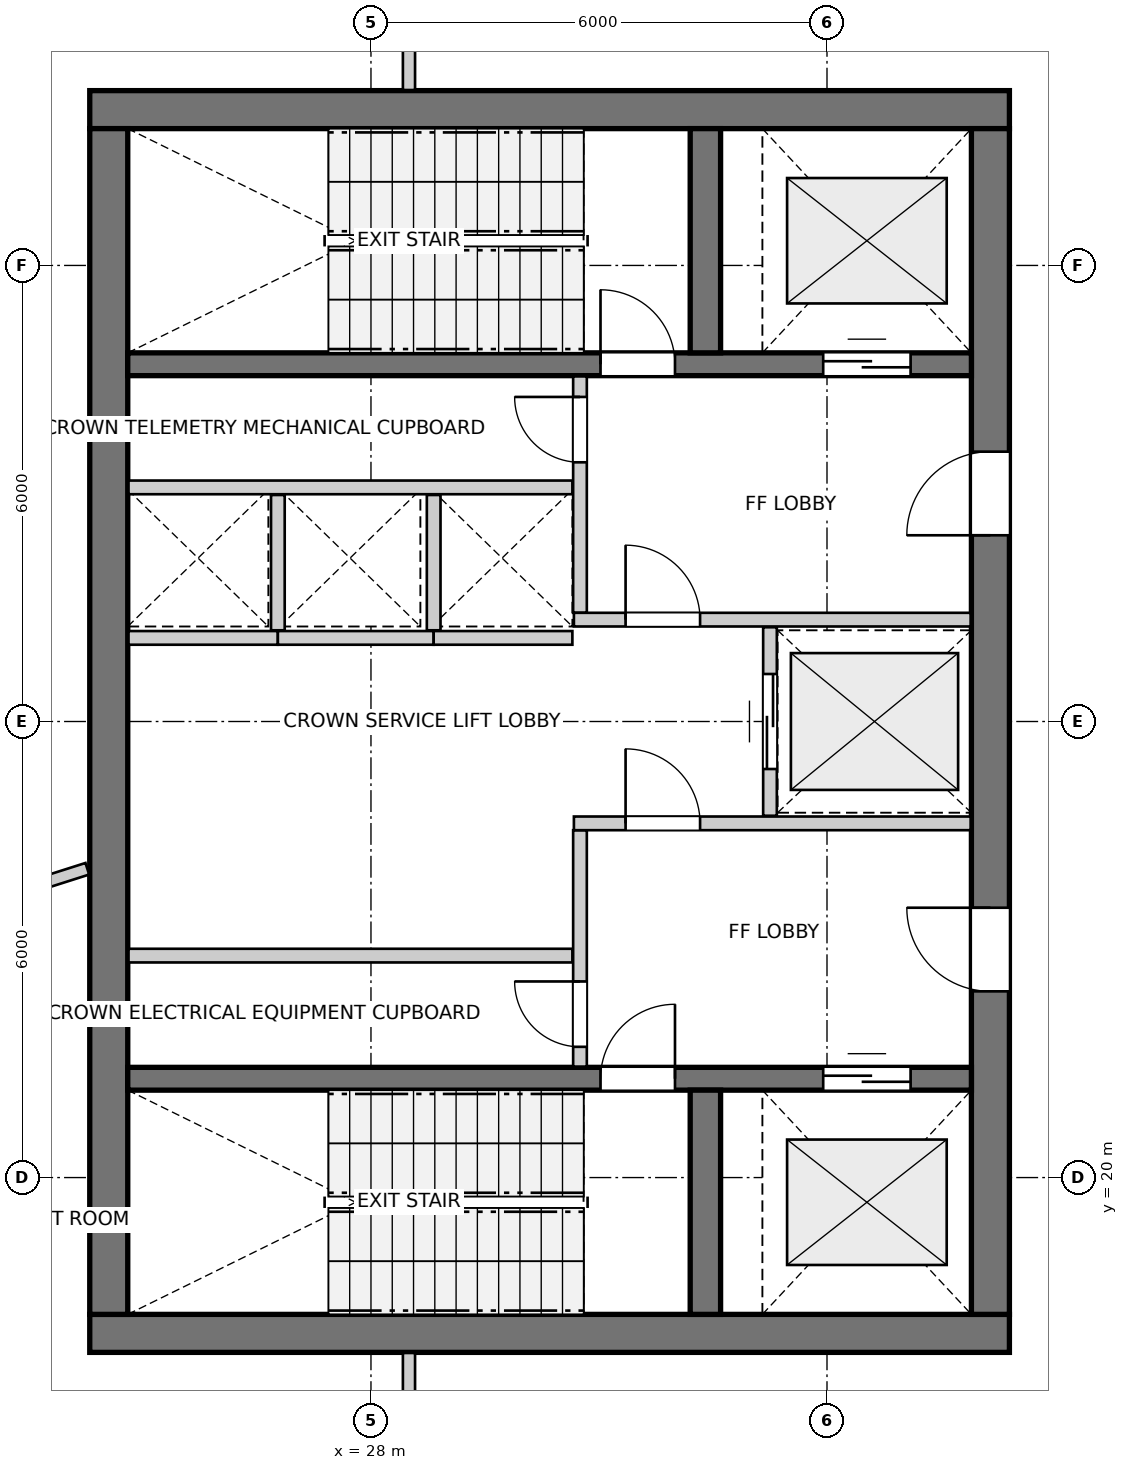
"""IFC4 building model, lengths in metres.
Left out: names, types, materials, properties, quantities, classifications, styles, units other than length and angle.
Written with IfcOpenShell. Run it as: python <this file> out.ifc"""

import sys

from ifc_helpers import new_model, si_unit, direction, frame, frame_2d, origin, place, context, subcontext, project, spatial, rectangle, extrude, source, transform, mapped, element, fill, save


model = new_model("IFC4")
c1 = context("Model", 3, precision=1e-05, world=origin(), true_north=direction((0.0, 1.0)))
c2 = subcontext(c1, "Body", "Model", "MODEL_VIEW")
j1 = project(units=[si_unit("LENGTHUNIT", "METRE"), si_unit("PLANEANGLEUNIT", "RADIAN")], contexts=[c1])
p1 = place(None, origin())
s1 = spatial("IfcSite", under=j1, at=p1, CompositionType="ELEMENT")
p2 = place(p1, origin())
s2 = spatial("IfcBuilding", under=s1, at=p2, CompositionType="ELEMENT")
p3 = place(p2, frame((0.0, 0.0, 253.2)))
s3 = spatial("IfcBuildingStorey", under=s2, at=p3, CompositionType="ELEMENT", Elevation=253.2)
for number, where, z_axis, x_axis in (
    (1, (24.3, 17.95, 0.0), (0.0, 0.0, 1.0), (1.0, 0.0, 0.0)),
    (2, (36.4, 34.05, 0.0), (0.0, 0.0, 1.0), (-1.0, 0.0, 0.0)),
):
    element("IfcWall", number, at=place(p3, frame(where, z_axis=z_axis, x_axis=x_axis)), inside=s3, PredefinedType="SHEAR", context=c2, shape_type="SweptSolid", body=[
        extrude(rectangle(XDim=12.1, YDim=0.5, at=frame_2d((6.05, 0.0))), origin(), (0.0, 0.0, 1.0), 4.05),
    ])
p4 = place(p3, frame((24.55, 33.8, 0.0), z_axis=(0.0, 0.0, 1.0), x_axis=(0.0, -1.0, 0.0)))
e3 = element("IfcWall", 3, at=p4, inside=s3, PredefinedType="SHEAR", context=c2, shape_type="SweptSolid", body=[
    extrude(rectangle(XDim=15.6, YDim=0.5, at=frame_2d((7.8, 0.0))), origin(), (0.0, 0.0, 1.0), 4.05),
])
p5 = place(p3, frame((36.15, 18.2, 0.0), z_axis=(0.0, 0.0, 1.0), x_axis=(0.0, 1.0, 0.0)))
e4 = element("IfcWall", 4, at=p5, inside=s3, PredefinedType="SHEAR", context=c2, shape_type="SweptSolid", body=[
    extrude(rectangle(XDim=15.6, YDim=0.5, at=frame_2d((7.8, 0.0))), origin(), (0.0, 0.0, 1.0), 4.05),
])
p6 = place(p5, frame((4.25, 0.0, 0.0)))
e5 = element("IfcOpeningElement", 5, at=p6, cuts=e4, PredefinedType="OPENING", context=c2, shape_type="SweptSolid", body=[
    extrude(rectangle(XDim=1.1, YDim=2.15, at=frame_2d((0.55, 1.075))), frame((0.0, 0.26, 0.0), z_axis=(0.0, -1.0, 0.0), x_axis=(1.0, 0.0, 0.0)), (0.0, 0.0, 1.0), 0.52),
])
p7 = place(p5, frame((10.25, 0.0, 0.0)))
e6 = element("IfcOpeningElement", 6, at=p7, cuts=e4, PredefinedType="OPENING", context=c2, shape_type="SweptSolid", body=[
    extrude(rectangle(XDim=1.1, YDim=2.15, at=frame_2d((0.55, 1.075))), frame((0.0, 0.26, 0.0), z_axis=(0.0, -1.0, 0.0), x_axis=(1.0, 0.0, 0.0)), (0.0, 0.0, 1.0), 0.52),
])
p8 = place(p3, frame((24.8, 21.3, 0.0), z_axis=(0.0, 0.0, 1.0), x_axis=(1.0, 0.0, 0.0)))
e7 = element("IfcWall", 7, at=p8, inside=s3, PredefinedType="SHEAR", context=c2, shape_type="SweptSolid", body=[
    extrude(rectangle(XDim=11.1, YDim=0.3, at=frame_2d((5.55, 0.0))), origin(), (0.0, 0.0, 1.0), 4.05),
])
p9 = place(p8, frame((6.22, 0.0, 0.0)))
e8 = element("IfcOpeningElement", 8, at=p9, cuts=e7, PredefinedType="OPENING", context=c2, shape_type="SweptSolid", body=[
    extrude(rectangle(XDim=0.98, YDim=2.15, at=frame_2d((0.49, 1.075))), frame((0.0, 0.16, 0.0), z_axis=(0.0, -1.0, 0.0), x_axis=(1.0, 0.0, 0.0)), (0.0, 0.0, 1.0), 0.32),
])
p10 = place(p8, frame((9.15, 0.0, 0.0)))
e9 = element("IfcOpeningElement", 9, at=p10, cuts=e7, PredefinedType="OPENING", context=c2, shape_type="SweptSolid", body=[
    extrude(rectangle(XDim=1.15, YDim=2.15, at=frame_2d((0.575, 1.075))), frame((0.0, 0.16, 0.0), z_axis=(0.0, -1.0, 0.0), x_axis=(1.0, 0.0, 0.0)), (0.0, 0.0, 1.0), 0.32),
])
p11 = place(p3, frame((32.4, 18.2, 0.0), z_axis=(0.0, 0.0, 1.0), x_axis=(0.0, 1.0, 0.0)))
e10 = element("IfcWall", 10, at=p11, inside=s3, PredefinedType="SHEAR", context=c2, shape_type="SweptSolid", body=[
    extrude(rectangle(XDim=2.95, YDim=0.4, at=frame_2d((1.475, 0.0))), origin(), (0.0, 0.0, 1.0), 4.05),
])
p12 = place(p3, frame((24.8, 30.7, 0.0), z_axis=(0.0, 0.0, 1.0), x_axis=(1.0, 0.0, 0.0)))
e11 = element("IfcWall", 11, at=p12, inside=s3, PredefinedType="SHEAR", context=c2, shape_type="SweptSolid", body=[
    extrude(rectangle(XDim=11.1, YDim=0.3, at=frame_2d((5.55, 0.0))), origin(), (0.0, 0.0, 1.0), 4.05),
])
p13 = place(p12, frame((6.22, 0.0, 0.0)))
e12 = element("IfcOpeningElement", 12, at=p13, cuts=e11, PredefinedType="OPENING", context=c2, shape_type="SweptSolid", body=[
    extrude(rectangle(XDim=0.98, YDim=2.15, at=frame_2d((0.49, 1.075))), frame((0.0, 0.16, 0.0), z_axis=(0.0, -1.0, 0.0), x_axis=(1.0, 0.0, 0.0)), (0.0, 0.0, 1.0), 0.32),
])
p14 = place(p12, frame((9.15, 0.0, 0.0)))
e13 = element("IfcOpeningElement", 13, at=p14, cuts=e11, PredefinedType="OPENING", context=c2, shape_type="SweptSolid", body=[
    extrude(rectangle(XDim=1.15, YDim=2.15, at=frame_2d((0.575, 1.075))), frame((0.0, 0.16, 0.0), z_axis=(0.0, -1.0, 0.0), x_axis=(1.0, 0.0, 0.0)), (0.0, 0.0, 1.0), 0.32),
])
p15 = place(p3, frame((32.4, 30.85, 0.0), z_axis=(0.0, 0.0, 1.0), x_axis=(0.0, 1.0, 0.0)))
e14 = element("IfcWall", 14, at=p15, inside=s3, PredefinedType="SHEAR", context=c2, shape_type="SweptSolid", body=[
    extrude(rectangle(XDim=2.95, YDim=0.4, at=frame_2d((1.475, 0.0))), origin(), (0.0, 0.0, 1.0), 4.05),
])
p16 = place(p3, frame((30.75, 21.46, 0.0), z_axis=(0.0, 0.0, 1.0), x_axis=(0.0, 1.0, 0.0)))
e15 = element("IfcWall", 15, at=p16, inside=s3, PredefinedType="PARTITIONING", context=c2, shape_type="SweptSolid", body=[
    extrude(rectangle(XDim=3.11, YDim=0.18, at=frame_2d((1.555, 0.0))), origin(), (0.0, 0.0, 1.0), 4.05),
])
p17 = place(p16, frame((0.26, 0.0, 0.0)))
e16 = element("IfcOpeningElement", 16, at=p17, cuts=e15, PredefinedType="OPENING", context=c2, shape_type="SweptSolid", body=[
    extrude(rectangle(XDim=0.86, YDim=2.05, at=frame_2d((0.43, 1.025))), frame((0.0, 0.1, 0.0), z_axis=(0.0, -1.0, 0.0), x_axis=(1.0, 0.0, 0.0)), (0.0, 0.0, 1.0), 0.2),
])
p18 = place(p3, frame((30.67, 24.66, 0.0), z_axis=(0.0, 0.0, 1.0), x_axis=(1.0, 0.0, 0.0)))
e17 = element("IfcWall", 17, at=p18, inside=s3, PredefinedType="PARTITIONING", context=c2, shape_type="SweptSolid", body=[
    extrude(rectangle(XDim=5.22, YDim=0.18, at=frame_2d((2.61, 0.0))), origin(), (0.0, 0.0, 1.0), 4.05),
])
p19 = place(p18, frame((0.68, 0.0, 0.0)))
e18 = element("IfcOpeningElement", 18, at=p19, cuts=e17, PredefinedType="OPENING", context=c2, shape_type="SweptSolid", body=[
    extrude(rectangle(XDim=0.98, YDim=2.15, at=frame_2d((0.49, 1.075))), frame((0.0, 0.1, 0.0), z_axis=(0.0, -1.0, 0.0), x_axis=(1.0, 0.0, 0.0)), (0.0, 0.0, 1.0), 0.2),
])
p20 = place(p3, frame((30.75, 27.43, 0.0), z_axis=(0.0, 0.0, 1.0), x_axis=(0.0, 1.0, 0.0)))
e19 = element("IfcWall", 19, at=p20, inside=s3, PredefinedType="PARTITIONING", context=c2, shape_type="SweptSolid", body=[
    extrude(rectangle(XDim=3.11, YDim=0.18, at=frame_2d((1.555, 0.0))), origin(), (0.0, 0.0, 1.0), 4.05),
])
p21 = place(p20, frame((1.98, 0.0, 0.0)))
e20 = element("IfcOpeningElement", 20, at=p21, cuts=e19, PredefinedType="OPENING", context=c2, shape_type="SweptSolid", body=[
    extrude(rectangle(XDim=0.86, YDim=2.05, at=frame_2d((0.43, 1.025))), frame((0.0, 0.1, 0.0), z_axis=(0.0, -1.0, 0.0), x_axis=(1.0, 0.0, 0.0)), (0.0, 0.0, 1.0), 0.2),
])
p22 = place(p3, frame((30.67, 27.34, 0.0), z_axis=(0.0, 0.0, 1.0), x_axis=(1.0, 0.0, 0.0)))
e21 = element("IfcWall", 21, at=p22, inside=s3, PredefinedType="PARTITIONING", context=c2, shape_type="SweptSolid", body=[
    extrude(rectangle(XDim=5.22, YDim=0.18, at=frame_2d((2.61, 0.0))), origin(), (0.0, 0.0, 1.0), 4.05),
])
p23 = place(p22, frame((0.68, 0.0, 0.0)))
e22 = element("IfcOpeningElement", 22, at=p23, cuts=e21, PredefinedType="OPENING", context=c2, shape_type="SweptSolid", body=[
    extrude(rectangle(XDim=0.98, YDim=2.15, at=frame_2d((0.49, 1.075))), frame((0.0, 0.1, 0.0), z_axis=(0.0, -1.0, 0.0), x_axis=(1.0, 0.0, 0.0)), (0.0, 0.0, 1.0), 0.2),
])
p24 = place(p3, frame((33.25, 24.76, 0.0), z_axis=(0.0, 0.0, 1.0), x_axis=(0.0, 1.0, 0.0)))
e23 = element("IfcWall", 23, at=p24, inside=s3, PredefinedType="PARTITIONING", context=c2, shape_type="SweptSolid", body=[
    extrude(rectangle(XDim=2.48, YDim=0.18, at=frame_2d((1.24, 0.0))), origin(), (0.0, 0.0, 1.0), 4.05),
])
p25 = place(p24, frame((0.615, 0.0, 0.0)))
e24 = element("IfcOpeningElement", 24, at=p25, cuts=e23, PredefinedType="OPENING", context=c2, shape_type="SweptSolid", body=[
    extrude(rectangle(XDim=1.25, YDim=2.15, at=frame_2d((0.625, 1.075))), frame((0.0, 0.1, 0.0), z_axis=(0.0, -1.0, 0.0), x_axis=(1.0, 0.0, 0.0)), (0.0, 0.0, 1.0), 0.2),
])
for number, where, z_axis, x_axis in (
    (25, (24.81, 22.92, 0.0), (0.0, 0.0, 1.0), (1.0, 0.0, 0.0)),
    (26, (24.81, 29.08, 0.0), (0.0, 0.0, 1.0), (1.0, 0.0, 0.0)),
):
    element("IfcWall", number, at=place(p3, frame(where, z_axis=z_axis, x_axis=x_axis)), inside=s3, PredefinedType="PARTITIONING", context=c2, shape_type="SweptSolid", body=[
        extrude(rectangle(XDim=5.84, YDim=0.18, at=frame_2d((2.92, 0.0))), origin(), (0.0, 0.0, 1.0), 4.05),
    ])
p26 = place(p3, frame((24.81, 27.1, 0.0), z_axis=(0.0, 0.0, 1.0), x_axis=(1.0, 0.0, 0.0)))
e27 = element("IfcWall", 27, at=p26, inside=s3, PredefinedType="PARTITIONING", context=c2, shape_type="SweptSolid", body=[
    extrude(rectangle(XDim=1.965, YDim=0.18, at=frame_2d((0.982, 0.0))), origin(), (0.0, 0.0, 1.0), 4.05),
])
p27 = place(p3, frame((26.775, 27.1, 0.0), z_axis=(0.0, 0.0, 1.0), x_axis=(1.0, 0.0, 0.0)))
e28 = element("IfcWall", 28, at=p27, inside=s3, PredefinedType="PARTITIONING", context=c2, shape_type="SweptSolid", body=[
    extrude(rectangle(XDim=2.05, YDim=0.18, at=frame_2d((1.025, 0.0))), origin(), (0.0, 0.0, 1.0), 4.05),
])
p28 = place(p3, frame((26.775, 27.2, 0.0), z_axis=(0.0, 0.0, 1.0), x_axis=(0.0, 1.0, 0.0)))
e29 = element("IfcWall", 29, at=p28, inside=s3, PredefinedType="PARTITIONING", context=c2, shape_type="SweptSolid", body=[
    extrude(rectangle(XDim=1.78, YDim=0.18, at=frame_2d((0.89, 0.0))), origin(), (0.0, 0.0, 1.0), 4.05),
])
p29 = place(p3, frame((28.825, 27.1, 0.0), z_axis=(0.0, 0.0, 1.0), x_axis=(1.0, 0.0, 0.0)))
e30 = element("IfcWall", 30, at=p29, inside=s3, PredefinedType="PARTITIONING", context=c2, shape_type="SweptSolid", body=[
    extrude(rectangle(XDim=1.825, YDim=0.18, at=frame_2d((0.913, 0.0))), origin(), (0.0, 0.0, 1.0), 4.05),
])
p30 = place(p3, frame((28.825, 27.2, 0.0), z_axis=(0.0, 0.0, 1.0), x_axis=(0.0, 1.0, 0.0)))
e31 = element("IfcWall", 31, at=p30, inside=s3, PredefinedType="PARTITIONING", context=c2, shape_type="SweptSolid", body=[
    extrude(rectangle(XDim=1.78, YDim=0.18, at=frame_2d((0.89, 0.0))), origin(), (0.0, 0.0, 1.0), 4.05),
])
p31 = place(p3, frame((14.274, 20.879, 0.0), z_axis=(0.0, 0.0, 1.0), x_axis=(0.952821173335, 0.303532225052, 0.0)))
e32 = element("IfcWall", 32, at=p31, inside=s3, PredefinedType="PARTITIONING", context=c2, shape_type="SweptSolid", body=[
    extrude(rectangle(XDim=10.489, YDim=0.16, at=frame_2d((5.244, 0.0))), origin(), (0.0, 0.0, 1.0), 3.318),
])
for number, where, z_axis, x_axis in (
    (33, (28.5, 34.308, 0.0), (0.0, 0.0, 1.0), (0.0, 1.0, 0.0)),
    (34, (28.5, 15.838, 0.0), (0.0, 0.0, 1.0), (0.0, 1.0, 0.0)),
):
    element("IfcWall", number, at=place(p3, frame(where, z_axis=z_axis, x_axis=x_axis)), inside=s3, PredefinedType="PARTITIONING", context=c2, shape_type="SweptSolid", body=[
        extrude(rectangle(XDim=1.854, YDim=0.16, at=frame_2d((0.927, 0.0))), origin(), (0.0, 0.0, 1.0), 4.05),
    ])
m1 = source(origin(), c2, "Body", "SweptSolid", [
    extrude(rectangle(XDim=0.98, YDim=2.15, at=frame_2d((0.49, 1.075))), frame((0.0, 0.025, 0.0), z_axis=(0.0, -1.0, 0.0), x_axis=(1.0, 0.0, 0.0)), (0.0, 0.0, 1.0), 0.05),
])
p32 = place(p9, origin())
e35 = element("IfcDoor", 35, at=p32, inside=s3, OperationType="SINGLE_SWING_RIGHT", PredefinedType="DOOR", context=c2, shape_type="MappedRepresentation", body=[
    mapped(m1, transform((0.0, 0.0, 0.0), x_axis=(1.0, 0.0, 0.0), y_axis=(0.0, 1.0, 0.0), z_axis=(0.0, 0.0, 1.0), scale=1.0)),
])
fill(e8, e35)
m2 = source(origin(), c2, "Body", "SweptSolid", [
    extrude(rectangle(XDim=1.15, YDim=2.15, at=frame_2d((0.575, 1.075))), frame((0.0, 0.025, 0.0), z_axis=(0.0, -1.0, 0.0), x_axis=(1.0, 0.0, 0.0)), (0.0, 0.0, 1.0), 0.05),
])
p33 = place(p10, origin())
e36 = element("IfcDoor", 36, at=p33, inside=s3, OperationType="DOUBLE_DOOR_SLIDING", PredefinedType="DOOR", context=c2, shape_type="MappedRepresentation", body=[
    mapped(m2, transform((0.0, 0.0, 0.0), x_axis=(1.0, 0.0, 0.0), y_axis=(0.0, 1.0, 0.0), z_axis=(0.0, 0.0, 1.0), scale=1.0)),
])
fill(e9, e36)
p34 = place(p13, origin())
e37 = element("IfcDoor", 37, at=p34, inside=s3, OperationType="SINGLE_SWING_LEFT", PredefinedType="DOOR", context=c2, shape_type="MappedRepresentation", body=[
    mapped(m1, transform((0.0, 0.0, 0.0), x_axis=(1.0, 0.0, 0.0), y_axis=(0.0, 1.0, 0.0), z_axis=(0.0, 0.0, 1.0), scale=1.0)),
])
fill(e12, e37)
p35 = place(p14, origin())
e38 = element("IfcDoor", 38, at=p35, inside=s3, OperationType="DOUBLE_DOOR_SLIDING", PredefinedType="DOOR", context=c2, shape_type="MappedRepresentation", body=[
    mapped(m2, transform((0.0, 0.0, 0.0), x_axis=(1.0, 0.0, 0.0), y_axis=(0.0, 1.0, 0.0), z_axis=(0.0, 0.0, 1.0), scale=1.0)),
])
fill(e13, e38)
m3 = source(origin(), c2, "Body", "SweptSolid", [
    extrude(rectangle(XDim=1.1, YDim=2.15, at=frame_2d((0.55, 1.075))), frame((0.0, 0.025, 0.0), z_axis=(0.0, -1.0, 0.0), x_axis=(1.0, 0.0, 0.0)), (0.0, 0.0, 1.0), 0.05),
])
p36 = place(p6, origin())
e39 = element("IfcDoor", 39, at=p36, inside=s3, OperationType="SINGLE_SWING_RIGHT", PredefinedType="DOOR", context=c2, shape_type="MappedRepresentation", body=[
    mapped(m3, transform((0.0, 0.0, 0.0), x_axis=(1.0, 0.0, 0.0), y_axis=(0.0, 1.0, 0.0), z_axis=(0.0, 0.0, 1.0), scale=1.0)),
])
fill(e5, e39)
p37 = place(p7, origin())
e40 = element("IfcDoor", 40, at=p37, inside=s3, OperationType="SINGLE_SWING_LEFT", PredefinedType="DOOR", context=c2, shape_type="MappedRepresentation", body=[
    mapped(m3, transform((0.0, 0.0, 0.0), x_axis=(1.0, 0.0, 0.0), y_axis=(0.0, 1.0, 0.0), z_axis=(0.0, 0.0, 1.0), scale=1.0)),
])
fill(e6, e40)
m4 = source(origin(), c2, "Body", "SweptSolid", [
    extrude(rectangle(XDim=0.86, YDim=2.05, at=frame_2d((0.43, 1.025))), frame((0.0, 0.025, 0.0), z_axis=(0.0, -1.0, 0.0), x_axis=(1.0, 0.0, 0.0)), (0.0, 0.0, 1.0), 0.05),
])
p38 = place(p17, origin())
e41 = element("IfcDoor", 41, at=p38, inside=s3, OperationType="SINGLE_SWING_RIGHT", PredefinedType="DOOR", context=c2, shape_type="MappedRepresentation", body=[
    mapped(m4, transform((0.0, 0.0, 0.0), x_axis=(1.0, 0.0, 0.0), y_axis=(0.0, 1.0, 0.0), z_axis=(0.0, 0.0, 1.0), scale=1.0)),
])
fill(e16, e41)
p39 = place(p19, origin())
e42 = element("IfcDoor", 42, at=p39, inside=s3, OperationType="SINGLE_SWING_LEFT", PredefinedType="DOOR", context=c2, shape_type="MappedRepresentation", body=[
    mapped(m1, transform((0.0, 0.0, 0.0), x_axis=(1.0, 0.0, 0.0), y_axis=(0.0, 1.0, 0.0), z_axis=(0.0, 0.0, 1.0), scale=1.0)),
])
fill(e18, e42)
p40 = place(p21, origin())
e43 = element("IfcDoor", 43, at=p40, inside=s3, OperationType="SINGLE_SWING_RIGHT", PredefinedType="DOOR", context=c2, shape_type="MappedRepresentation", body=[
    mapped(m4, transform((0.0, 0.0, 0.0), x_axis=(1.0, 0.0, 0.0), y_axis=(0.0, 1.0, 0.0), z_axis=(0.0, 0.0, 1.0), scale=1.0)),
])
fill(e20, e43)
p41 = place(p23, origin())
e44 = element("IfcDoor", 44, at=p41, inside=s3, OperationType="SINGLE_SWING_LEFT", PredefinedType="DOOR", context=c2, shape_type="MappedRepresentation", body=[
    mapped(m1, transform((0.0, 0.0, 0.0), x_axis=(1.0, 0.0, 0.0), y_axis=(0.0, 1.0, 0.0), z_axis=(0.0, 0.0, 1.0), scale=1.0)),
])
fill(e22, e44)
m5 = source(origin(), c2, "Body", "SweptSolid", [
    extrude(rectangle(XDim=1.25, YDim=2.15, at=frame_2d((0.625, 1.075))), frame((0.0, 0.025, 0.0), z_axis=(0.0, -1.0, 0.0), x_axis=(1.0, 0.0, 0.0)), (0.0, 0.0, 1.0), 0.05),
])
p42 = place(p25, origin())
e45 = element("IfcDoor", 45, at=p42, inside=s3, OperationType="DOUBLE_DOOR_SLIDING", PredefinedType="DOOR", context=c2, shape_type="MappedRepresentation", body=[
    mapped(m5, transform((0.0, 0.0, 0.0), x_axis=(1.0, 0.0, 0.0), y_axis=(0.0, 1.0, 0.0), z_axis=(0.0, 0.0, 1.0), scale=1.0)),
])
fill(e24, e45)
save(model, sys.argv[1])
